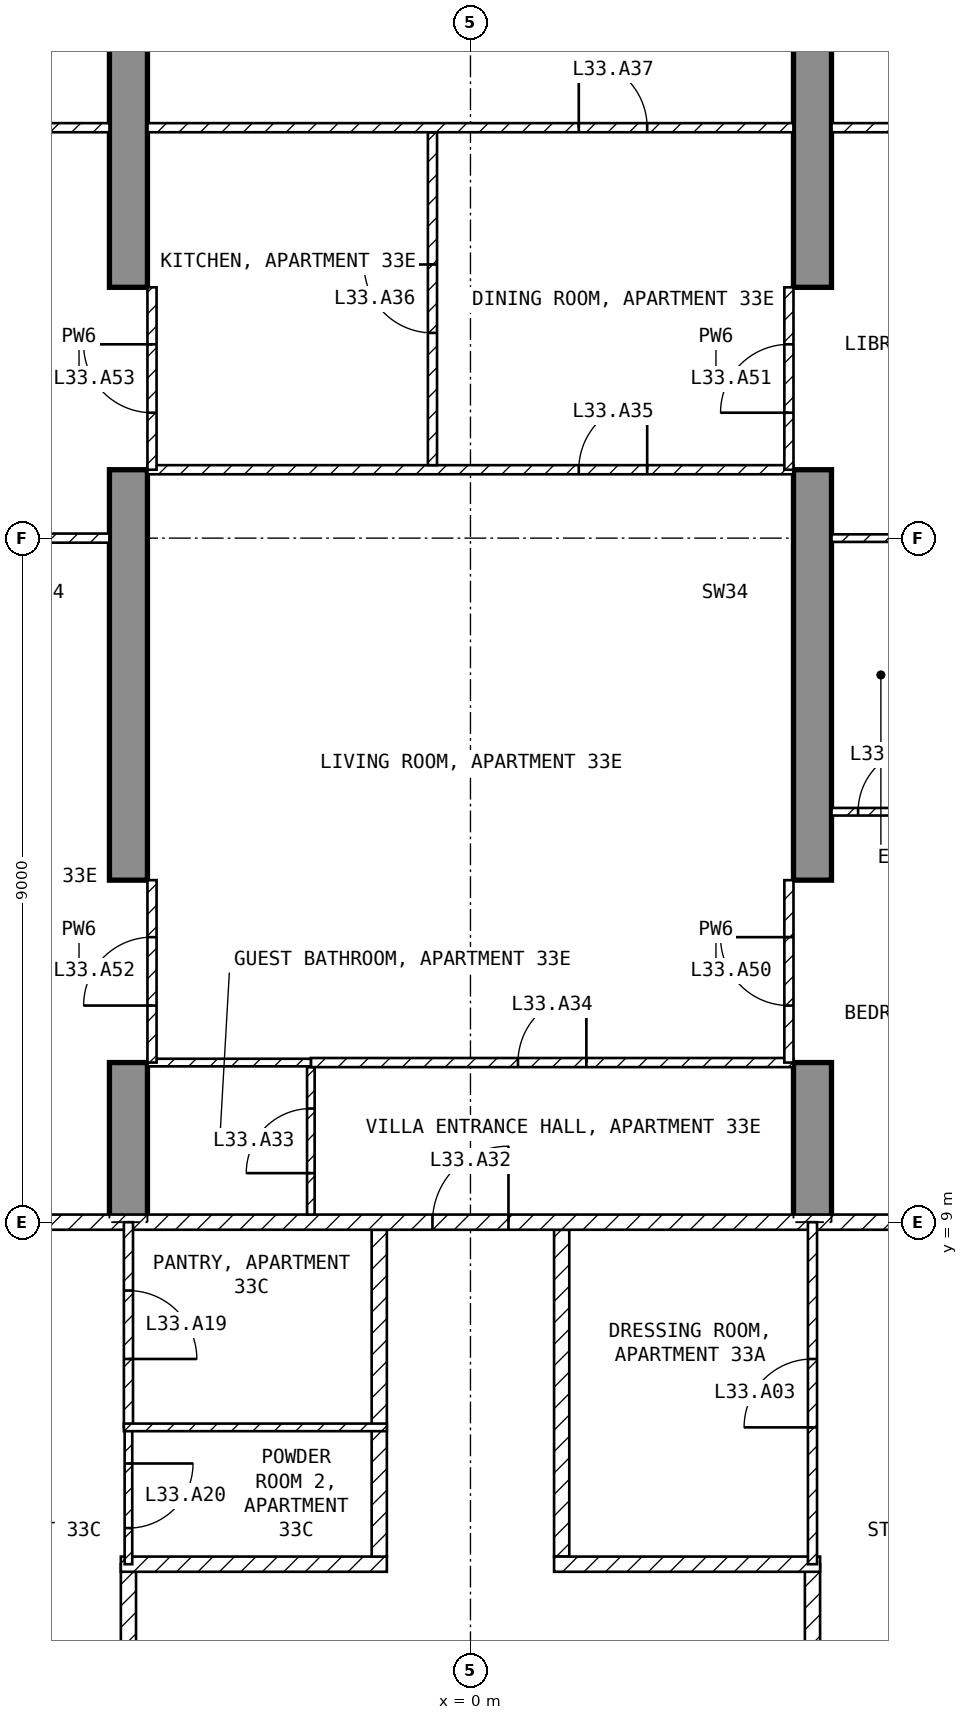
"""IFC4 building model, lengths in metres.
Left out: names, types, materials, properties, quantities, classifications, styles, units other than length and angle.
Written with IfcOpenShell. Run it as: python <this file> out.ifc"""

import sys

from ifc_helpers import new_model, si_unit, direction, frame, frame_2d, origin, place, context, subcontext, project, spatial, polyline, rectangle, outline, extrude, element, fill, save


model = new_model("IFC4")
c1 = context("Model", 3, precision=1e-05, world=origin(), true_north=direction((0.0, 1.0)))
c2 = subcontext(c1, "Body", "Model", "MODEL_VIEW")
j1 = project(units=[si_unit("LENGTHUNIT", "METRE"), si_unit("PLANEANGLEUNIT", "RADIAN")], contexts=[c1])
p1 = place(None, origin())
s1 = spatial("IfcSite", under=j1, at=p1, CompositionType="ELEMENT")
p2 = place(p1, origin())
s2 = spatial("IfcBuilding", under=s1, at=p2, CompositionType="ELEMENT")
p3 = place(p2, frame((0.0, 0.0, 137.4)))
s3 = spatial("IfcBuildingStorey", under=s2, at=p3, CompositionType="ELEMENT", Elevation=137.4)
for number, where, z_axis, x_axis in (
    (1, (-4.75, 9.0, -0.25), (1.0, 0.0, 0.0), (0.0, 1.0, 0.0)),
    (2, (4.25, 9.0, -0.25), (1.0, 0.0, 0.0), (0.0, 1.0, 0.0)),
):
    element("IfcWall", number, at=place(p3, frame(where, z_axis=z_axis, x_axis=x_axis)), inside=s3, PredefinedType="SHEAR", context=c2, shape_type="SweptSolid", body=[
        extrude(outline(polyline([(0.0, 0.0), (2.1, 0.0), (2.1, 2.65), (4.5, 2.65), (4.5, 0.0), (9.9, 0.0), (9.9, 2.65), (12.3, 2.65), (12.3, 0.0), (16.55, 0.0), (16.55, 3.5), (0.0, 3.5), (0.0, 0.0)])), origin(), (0.0, 0.0, 1.0), 0.5),
    ])
p4 = place(p3, frame((4.5, 4.5, 0.0), z_axis=(0.0, 0.0, 1.0), x_axis=(0.0, -1.0, 0.0)))
e3 = element("IfcWall", 3, at=p4, inside=s3, PredefinedType="PARTITIONING", context=c2, shape_type="SweptSolid", body=[
    extrude(rectangle(XDim=3.2, YDim=0.2, at=frame_2d((1.6, 0.0))), origin(), (0.0, 0.0, 1.0), 3.25),
])
p5 = place(p3, frame((1.2, 8.9, 0.0), z_axis=(0.0, 0.0, 1.0), x_axis=(0.0, -1.0, 0.0)))
e4 = element("IfcWall", 4, at=p5, inside=s3, PredefinedType="PARTITIONING", context=c2, shape_type="SweptSolid", body=[
    extrude(rectangle(XDim=4.3, YDim=0.2, at=frame_2d((2.15, 0.0))), origin(), (0.0, 0.0, 1.0), 3.25),
])
p6 = place(p3, frame((1.1, 4.5, 0.0), z_axis=(0.0, 0.0, 1.0), x_axis=(1.0, 0.0, 0.0)))
e5 = element("IfcWall", 5, at=p6, inside=s3, PredefinedType="PARTITIONING", context=c2, shape_type="SweptSolid", body=[
    extrude(rectangle(XDim=3.5, YDim=0.2, at=frame_2d((1.75, 0.0))), origin(), (0.0, 0.0, 1.0), 3.25),
])
p7 = place(p3, frame((-4.5, 1.3, 0.0), z_axis=(0.0, 0.0, 1.0), x_axis=(0.0, 1.0, 0.0)))
e6 = element("IfcWall", 6, at=p7, inside=s3, PredefinedType="PARTITIONING", context=c2, shape_type="SweptSolid", body=[
    extrude(rectangle(XDim=3.2, YDim=0.2, at=frame_2d((1.6, 0.0))), origin(), (0.0, 0.0, 1.0), 3.25),
])
p8 = place(p3, frame((-4.6, 4.5, 0.0), z_axis=(0.0, 0.0, 1.0), x_axis=(1.0, 0.0, 0.0)))
e7 = element("IfcWall", 7, at=p8, inside=s3, PredefinedType="PARTITIONING", context=c2, shape_type="SweptSolid", body=[
    extrude(rectangle(XDim=3.5, YDim=0.2, at=frame_2d((1.75, 0.0))), origin(), (0.0, 0.0, 1.0), 3.25),
])
p9 = place(p3, frame((-1.2, 4.6, 0.0), z_axis=(0.0, 0.0, 1.0), x_axis=(0.0, 1.0, 0.0)))
e8 = element("IfcWall", 8, at=p9, inside=s3, PredefinedType="PARTITIONING", context=c2, shape_type="SweptSolid", body=[
    extrude(rectangle(XDim=4.3, YDim=0.2, at=frame_2d((2.15, 0.0))), origin(), (0.0, 0.0, 1.0), 3.25),
])
p10 = place(p3, frame((-8.92, 9.0, 0.0), z_axis=(0.0, 0.0, 1.0), x_axis=(1.0, 0.0, 0.0)))
e9 = element("IfcWall", 9, at=p10, inside=s3, PredefinedType="PARTITIONING", context=c2, shape_type="SweptSolid", body=[
    extrude(rectangle(XDim=17.84, YDim=0.2, at=frame_2d((8.92, 0.0))), origin(), (0.0, 0.0, 1.0), 3.25),
])
p11 = place(p10, frame((8.42, 0.0, 0.0)))
e10 = element("IfcOpeningElement", 10, at=p11, cuts=e9, PredefinedType="OPENING", context=c2, shape_type="SweptSolid", body=[
    extrude(rectangle(XDim=1.0, YDim=2.1, at=frame_2d((0.5, 1.05))), frame((0.0, 0.11, 0.0), z_axis=(0.0, -1.0, 0.0), x_axis=(1.0, 0.0, 0.0)), (0.0, 0.0, 1.0), 0.22),
])
p12 = place(p3, frame((4.5, 4.5, 0.0), z_axis=(0.0, 0.0, 1.0), x_axis=(0.0, 1.0, 0.0)))
e11 = element("IfcWall", 11, at=p12, inside=s3, PredefinedType="PARTITIONING", context=c2, shape_type="SweptSolid", body=[
    extrude(rectangle(XDim=4.5, YDim=0.12, at=frame_2d((2.25, 0.0))), origin(), (0.0, 0.0, 1.0), 3.25),
])
p13 = place(p12, frame((1.8, 0.0, 0.0)))
e12 = element("IfcOpeningElement", 12, at=p13, cuts=e11, PredefinedType="OPENING", context=c2, shape_type="SweptSolid", body=[
    extrude(rectangle(XDim=0.9, YDim=2.1, at=frame_2d((0.45, 1.05))), frame((0.0, 0.07, 0.0), z_axis=(0.0, -1.0, 0.0), x_axis=(1.0, 0.0, 0.0)), (0.0, 0.0, 1.0), 0.14),
])
p14 = place(p3, frame((-4.5, 6.3, 0.0), z_axis=(0.0, 0.0, 1.0), x_axis=(0.0, -1.0, 0.0)))
e13 = element("IfcWall", 13, at=p14, inside=s3, PredefinedType="PARTITIONING", context=c2, shape_type="SweptSolid", body=[
    extrude(rectangle(XDim=1.8, YDim=0.1, at=frame_2d((0.9, 0.0))), origin(), (0.0, 0.0, 1.0), 3.25),
])
p15 = place(p14, frame((0.475, 0.0, 0.0)))
e14 = element("IfcOpeningElement", 14, at=p15, cuts=e13, PredefinedType="OPENING", context=c2, shape_type="SweptSolid", body=[
    extrude(rectangle(XDim=0.85, YDim=2.1, at=frame_2d((0.425, 1.05))), frame((0.0, 0.06, 0.0), z_axis=(0.0, -1.0, 0.0), x_axis=(1.0, 0.0, 0.0)), (0.0, 0.0, 1.0), 0.12),
])
p16 = place(p3, frame((-4.5, 9.0, 0.0), z_axis=(0.0, 0.0, 1.0), x_axis=(0.0, -1.0, 0.0)))
e15 = element("IfcWall", 15, at=p16, inside=s3, PredefinedType="PARTITIONING", context=c2, shape_type="SweptSolid", body=[
    extrude(rectangle(XDim=2.7, YDim=0.12, at=frame_2d((1.35, 0.0))), origin(), (0.0, 0.0, 1.0), 3.25),
])
p17 = place(p16, frame((0.9, 0.0, 0.0)))
e16 = element("IfcOpeningElement", 16, at=p17, cuts=e15, PredefinedType="OPENING", context=c2, shape_type="SweptSolid", body=[
    extrude(rectangle(XDim=0.9, YDim=2.1, at=frame_2d((0.45, 1.05))), frame((0.0, 0.07, 0.0), z_axis=(0.0, -1.0, 0.0), x_axis=(1.0, 0.0, 0.0)), (0.0, 0.0, 1.0), 0.14),
])
p18 = place(p3, frame((-4.56, 6.3, 0.0), z_axis=(0.0, 0.0, 1.0), x_axis=(1.0, 0.0, 0.0)))
e17 = element("IfcWall", 17, at=p18, inside=s3, PredefinedType="PARTITIONING", context=c2, shape_type="SweptSolid", body=[
    extrude(rectangle(XDim=3.46, YDim=0.1, at=frame_2d((1.73, 0.0))), origin(), (0.0, 0.0, 1.0), 3.25),
])
p19 = place(p3, frame((-2.1, 9.1, 0.0), z_axis=(0.0, 0.0, 1.0), x_axis=(0.0, 1.0, 0.0)))
e18 = element("IfcWall", 18, at=p19, inside=s3, PredefinedType="PARTITIONING", context=c2, shape_type="SweptSolid", body=[
    extrude(rectangle(XDim=1.94, YDim=0.1, at=frame_2d((0.97, 0.0))), origin(), (0.0, 0.0, 1.0), 3.25),
])
p20 = place(p19, frame((0.545, 0.0, 0.0)))
e19 = element("IfcOpeningElement", 19, at=p20, cuts=e18, PredefinedType="OPENING", context=c2, shape_type="SweptSolid", body=[
    extrude(rectangle(XDim=0.85, YDim=2.1, at=frame_2d((0.425, 1.05))), frame((0.0, 0.06, 0.0), z_axis=(0.0, -1.0, 0.0), x_axis=(1.0, 0.0, 0.0)), (0.0, 0.0, 1.0), 0.12),
])
p21 = place(p3, frame((-2.1, 11.1, 0.0), z_axis=(0.0, 0.0, 1.0), x_axis=(1.0, 0.0, 0.0)))
e20 = element("IfcWall", 20, at=p21, inside=s3, PredefinedType="PARTITIONING", context=c2, shape_type="SweptSolid", body=[
    extrude(rectangle(XDim=6.35, YDim=0.12, at=frame_2d((3.175, 0.0))), origin(), (0.0, 0.0, 1.0), 3.25),
])
p22 = place(p21, frame((2.725, 0.0, 0.0)))
e21 = element("IfcOpeningElement", 21, at=p22, cuts=e20, PredefinedType="OPENING", context=c2, shape_type="SweptSolid", body=[
    extrude(rectangle(XDim=0.9, YDim=2.1, at=frame_2d((0.45, 1.05))), frame((0.0, 0.07, 0.0), z_axis=(0.0, -1.0, 0.0), x_axis=(1.0, 0.0, 0.0)), (0.0, 0.0, 1.0), 0.14),
])
p23 = place(p3, frame((-4.25, 11.1, 0.0), z_axis=(0.0, 0.0, 1.0), x_axis=(1.0, 0.0, 0.0)))
e22 = element("IfcWall", 22, at=p23, inside=s3, PredefinedType="PARTITIONING", context=c2, shape_type="SweptSolid", body=[
    extrude(rectangle(XDim=2.15, YDim=0.1, at=frame_2d((1.075, 0.0))), origin(), (0.0, 0.0, 1.0), 3.25),
])
p24 = place(p3, frame((-4.25, 18.9, 0.0), z_axis=(0.0, 0.0, 1.0), x_axis=(1.0, 0.0, 0.0)))
e23 = element("IfcWall", 23, at=p24, inside=s3, PredefinedType="PARTITIONING", context=c2, shape_type="SweptSolid", body=[
    extrude(rectangle(XDim=8.5, YDim=0.12, at=frame_2d((4.25, 0.0))), origin(), (0.0, 0.0, 1.0), 3.25),
])
p25 = place(p24, frame((5.675, 0.0, 0.0)))
e24 = element("IfcOpeningElement", 24, at=p25, cuts=e23, PredefinedType="OPENING", context=c2, shape_type="SweptSolid", body=[
    extrude(rectangle(XDim=0.9, YDim=2.1, at=frame_2d((0.45, 1.05))), frame((0.0, 0.07, 0.0), z_axis=(0.0, -1.0, 0.0), x_axis=(1.0, 0.0, 0.0)), (0.0, 0.0, 1.0), 0.14),
])
p26 = place(p3, frame((-0.5, 18.96, 0.0), z_axis=(0.0, 0.0, 1.0), x_axis=(0.0, 1.0, 0.0)))
e25 = element("IfcWall", 25, at=p26, inside=s3, PredefinedType="PARTITIONING", context=c2, shape_type="SweptSolid", body=[
    extrude(rectangle(XDim=4.38, YDim=0.12, at=frame_2d((2.19, 0.0))), origin(), (0.0, 0.0, 1.0), 3.25),
])
p27 = place(p26, frame((1.74, 0.0, 0.0)))
e26 = element("IfcOpeningElement", 26, at=p27, cuts=e25, PredefinedType="OPENING", context=c2, shape_type="SweptSolid", body=[
    extrude(rectangle(XDim=0.9, YDim=2.1, at=frame_2d((0.45, 1.05))), frame((0.0, 0.07, 0.0), z_axis=(0.0, -1.0, 0.0), x_axis=(1.0, 0.0, 0.0)), (0.0, 0.0, 1.0), 0.14),
])
p28 = place(p3, frame((-4.25, 23.4, 0.0), z_axis=(0.0, 0.0, 1.0), x_axis=(1.0, 0.0, 0.0)))
e27 = element("IfcWall", 27, at=p28, inside=s3, PredefinedType="PARTITIONING", context=c2, shape_type="SweptSolid", body=[
    extrude(rectangle(XDim=8.5, YDim=0.12, at=frame_2d((4.25, 0.0))), origin(), (0.0, 0.0, 1.0), 3.25),
])
p29 = place(p28, frame((5.675, 0.0, 0.0)))
e28 = element("IfcOpeningElement", 28, at=p29, cuts=e27, PredefinedType="OPENING", context=c2, shape_type="SweptSolid", body=[
    extrude(rectangle(XDim=0.9, YDim=2.1, at=frame_2d((0.45, 1.05))), frame((0.0, 0.07, 0.0), z_axis=(0.0, -1.0, 0.0), x_axis=(1.0, 0.0, 0.0)), (0.0, 0.0, 1.0), 0.14),
])
p30 = place(p3, frame((4.75, 14.4, 0.0), z_axis=(0.0, 0.0, 1.0), x_axis=(1.0, 0.0, 0.0)))
e29 = element("IfcWall", 29, at=p30, inside=s3, PredefinedType="PARTITIONING", context=c2, shape_type="SweptSolid", body=[
    extrude(rectangle(XDim=1.6, YDim=0.1, at=frame_2d((0.8, 0.0))), origin(), (0.0, 0.0, 1.0), 3.25),
])
p31 = place(p30, frame((0.35, 0.0, 0.0)))
e30 = element("IfcOpeningElement", 30, at=p31, cuts=e29, PredefinedType="OPENING", context=c2, shape_type="SweptSolid", body=[
    extrude(rectangle(XDim=0.85, YDim=2.1, at=frame_2d((0.425, 1.05))), frame((0.0, 0.06, 0.0), z_axis=(0.0, -1.0, 0.0), x_axis=(1.0, 0.0, 0.0)), (0.0, 0.0, 1.0), 0.12),
])
p32 = place(p3, frame((4.75, 18.0, 0.0), z_axis=(0.0, 0.0, 1.0), x_axis=(1.0, 0.0, 0.0)))
e31 = element("IfcWall", 31, at=p32, inside=s3, PredefinedType="PARTITIONING", context=c2, shape_type="SweptSolid", body=[
    extrude(rectangle(XDim=1.55, YDim=0.1, at=frame_2d((0.775, 0.0))), origin(), (0.0, 0.0, 1.0), 2.414),
])
p33 = place(p3, frame((4.75, 23.4, 0.0), z_axis=(0.0, 0.0, 1.0), x_axis=(1.0, 0.0, 0.0)))
e32 = element("IfcWall", 32, at=p33, inside=s3, PredefinedType="PARTITIONING", context=c2, shape_type="SweptSolid", body=[
    extrude(rectangle(XDim=2.37, YDim=0.12, at=frame_2d((1.185, 0.0))), origin(), (0.0, 0.0, 1.0), 3.25),
])
p34 = place(p3, frame((-8.92, 18.0, 0.0), z_axis=(0.0, 0.0, 1.0), x_axis=(1.0, 0.0, 0.0)))
e33 = element("IfcWall", 33, at=p34, inside=s3, PredefinedType="PARTITIONING", context=c2, shape_type="SweptSolid", body=[
    extrude(rectangle(XDim=4.17, YDim=0.12, at=frame_2d((2.085, 0.0))), origin(), (0.0, 0.0, 1.0), 2.414),
])
p35 = place(p3, frame((-7.12, 23.4, 0.0), z_axis=(0.0, 0.0, 1.0), x_axis=(1.0, 0.0, 0.0)))
e34 = element("IfcWall", 34, at=p35, inside=s3, PredefinedType="PARTITIONING", context=c2, shape_type="SweptSolid", body=[
    extrude(rectangle(XDim=2.37, YDim=0.12, at=frame_2d((1.185, 0.0))), origin(), (0.0, 0.0, 1.0), 3.25),
])
p36 = place(p3, frame((4.19, 11.1, 0.0), z_axis=(0.0, 0.0, 1.0), x_axis=(0.0, 1.0, 0.0)))
e35 = element("IfcWall", 35, at=p36, inside=s3, PredefinedType="PARTITIONING", context=c2, shape_type="SweptSolid", body=[
    extrude(rectangle(XDim=2.4, YDim=0.12, at=frame_2d((1.2, 0.0))), origin(), (0.0, 0.0, 1.0), 2.4),
])
p37 = place(p36, frame((0.75, 0.0, 0.0)))
e36 = element("IfcOpeningElement", 36, at=p37, cuts=e35, PredefinedType="OPENING", context=c2, shape_type="SweptSolid", body=[
    extrude(rectangle(XDim=0.9, YDim=2.1, at=frame_2d((0.45, 1.05))), frame((0.0, 0.07, 0.0), z_axis=(0.0, -1.0, 0.0), x_axis=(1.0, 0.0, 0.0)), (0.0, 0.0, 1.0), 0.14),
])
p38 = place(p3, frame((4.19, 18.9, 0.0), z_axis=(0.0, 0.0, 1.0), x_axis=(0.0, 1.0, 0.0)))
e37 = element("IfcWall", 37, at=p38, inside=s3, PredefinedType="PARTITIONING", context=c2, shape_type="SweptSolid", body=[
    extrude(rectangle(XDim=2.4, YDim=0.12, at=frame_2d((1.2, 0.0))), origin(), (0.0, 0.0, 1.0), 2.4),
])
p39 = place(p38, frame((0.75, 0.0, 0.0)))
e38 = element("IfcOpeningElement", 38, at=p39, cuts=e37, PredefinedType="OPENING", context=c2, shape_type="SweptSolid", body=[
    extrude(rectangle(XDim=0.9, YDim=2.1, at=frame_2d((0.45, 1.05))), frame((0.0, 0.07, 0.0), z_axis=(0.0, -1.0, 0.0), x_axis=(1.0, 0.0, 0.0)), (0.0, 0.0, 1.0), 0.14),
])
p40 = place(p3, frame((-4.19, 11.1, 0.0), z_axis=(0.0, 0.0, 1.0), x_axis=(0.0, 1.0, 0.0)))
e39 = element("IfcWall", 39, at=p40, inside=s3, PredefinedType="PARTITIONING", context=c2, shape_type="SweptSolid", body=[
    extrude(rectangle(XDim=2.4, YDim=0.12, at=frame_2d((1.2, 0.0))), origin(), (0.0, 0.0, 1.0), 2.4),
])
p41 = place(p40, frame((0.75, 0.0, 0.0)))
e40 = element("IfcOpeningElement", 40, at=p41, cuts=e39, PredefinedType="OPENING", context=c2, shape_type="SweptSolid", body=[
    extrude(rectangle(XDim=0.9, YDim=2.1, at=frame_2d((0.45, 1.05))), frame((0.0, 0.07, 0.0), z_axis=(0.0, -1.0, 0.0), x_axis=(1.0, 0.0, 0.0)), (0.0, 0.0, 1.0), 0.14),
])
p42 = place(p3, frame((-4.19, 18.9, 0.0), z_axis=(0.0, 0.0, 1.0), x_axis=(0.0, 1.0, 0.0)))
e41 = element("IfcWall", 41, at=p42, inside=s3, PredefinedType="PARTITIONING", context=c2, shape_type="SweptSolid", body=[
    extrude(rectangle(XDim=2.4, YDim=0.12, at=frame_2d((1.2, 0.0))), origin(), (0.0, 0.0, 1.0), 2.4),
])
p43 = place(p42, frame((0.75, 0.0, 0.0)))
e42 = element("IfcOpeningElement", 42, at=p43, cuts=e41, PredefinedType="OPENING", context=c2, shape_type="SweptSolid", body=[
    extrude(rectangle(XDim=0.9, YDim=2.1, at=frame_2d((0.45, 1.05))), frame((0.0, 0.07, 0.0), z_axis=(0.0, -1.0, 0.0), x_axis=(1.0, 0.0, 0.0)), (0.0, 0.0, 1.0), 0.14),
])
p44 = place(p13, origin())
e43 = element("IfcDoor", 43, at=p44, inside=s3, OperationType="SINGLE_SWING_LEFT", PredefinedType="DOOR", context=c2, shape_type="SweptSolid", body=[
    extrude(rectangle(XDim=0.9, YDim=2.1, at=frame_2d((0.45, 1.05))), frame((0.0, 0.025, 0.0), z_axis=(0.0, -1.0, 0.0), x_axis=(1.0, 0.0, 0.0)), (0.0, 0.0, 1.0), 0.05),
])
fill(e12, e43)
p45 = place(p17, origin())
e44 = element("IfcDoor", 44, at=p45, inside=s3, OperationType="SINGLE_SWING_RIGHT", PredefinedType="DOOR", context=c2, shape_type="SweptSolid", body=[
    extrude(rectangle(XDim=0.9, YDim=2.1, at=frame_2d((0.45, 1.05))), frame((0.0, 0.025, 0.0), z_axis=(0.0, -1.0, 0.0), x_axis=(1.0, 0.0, 0.0)), (0.0, 0.0, 1.0), 0.05),
])
fill(e16, e44)
p46 = place(p15, origin())
e45 = element("IfcDoor", 45, at=p46, inside=s3, OperationType="SINGLE_SWING_LEFT", PredefinedType="DOOR", context=c2, shape_type="SweptSolid", body=[
    extrude(rectangle(XDim=0.85, YDim=2.1, at=frame_2d((0.425, 1.05))), frame((0.0, 0.025, 0.0), z_axis=(0.0, -1.0, 0.0), x_axis=(1.0, 0.0, 0.0)), (0.0, 0.0, 1.0), 0.05),
])
fill(e14, e45)
p47 = place(p11, origin())
e46 = element("IfcDoor", 46, at=p47, inside=s3, OperationType="SINGLE_SWING_RIGHT", PredefinedType="DOOR", context=c2, shape_type="SweptSolid", body=[
    extrude(rectangle(XDim=1.0, YDim=2.1, at=frame_2d((0.5, 1.05))), frame((0.0, 0.025, 0.0), z_axis=(0.0, -1.0, 0.0), x_axis=(1.0, 0.0, 0.0)), (0.0, 0.0, 1.0), 0.05),
])
fill(e10, e46)
p48 = place(p20, origin())
e47 = element("IfcDoor", 47, at=p48, inside=s3, OperationType="SINGLE_SWING_LEFT", PredefinedType="DOOR", context=c2, shape_type="SweptSolid", body=[
    extrude(rectangle(XDim=0.85, YDim=2.1, at=frame_2d((0.425, 1.05))), frame((0.0, 0.025, 0.0), z_axis=(0.0, -1.0, 0.0), x_axis=(1.0, 0.0, 0.0)), (0.0, 0.0, 1.0), 0.05),
])
fill(e19, e47)
p49 = place(p22, origin())
e48 = element("IfcDoor", 48, at=p49, inside=s3, OperationType="SINGLE_SWING_RIGHT", PredefinedType="DOOR", context=c2, shape_type="SweptSolid", body=[
    extrude(rectangle(XDim=0.9, YDim=2.1, at=frame_2d((0.45, 1.05))), frame((0.0, 0.025, 0.0), z_axis=(0.0, -1.0, 0.0), x_axis=(1.0, 0.0, 0.0)), (0.0, 0.0, 1.0), 0.05),
])
fill(e21, e48)
p50 = place(p25, origin())
e49 = element("IfcDoor", 49, at=p50, inside=s3, OperationType="SINGLE_SWING_RIGHT", PredefinedType="DOOR", context=c2, shape_type="SweptSolid", body=[
    extrude(rectangle(XDim=0.9, YDim=2.1, at=frame_2d((0.45, 1.05))), frame((0.0, 0.025, 0.0), z_axis=(0.0, -1.0, 0.0), x_axis=(1.0, 0.0, 0.0)), (0.0, 0.0, 1.0), 0.05),
])
fill(e24, e49)
p51 = place(p27, origin())
e50 = element("IfcDoor", 50, at=p51, inside=s3, OperationType="SINGLE_SWING_RIGHT", PredefinedType="DOOR", context=c2, shape_type="SweptSolid", body=[
    extrude(rectangle(XDim=0.9, YDim=2.1, at=frame_2d((0.45, 1.05))), frame((0.0, 0.025, 0.0), z_axis=(0.0, -1.0, 0.0), x_axis=(1.0, 0.0, 0.0)), (0.0, 0.0, 1.0), 0.05),
])
fill(e26, e50)
p52 = place(p29, origin())
e51 = element("IfcDoor", 51, at=p52, inside=s3, OperationType="SINGLE_SWING_LEFT", PredefinedType="DOOR", context=c2, shape_type="SweptSolid", body=[
    extrude(rectangle(XDim=0.9, YDim=2.1, at=frame_2d((0.45, 1.05))), frame((0.0, 0.025, 0.0), z_axis=(0.0, -1.0, 0.0), x_axis=(1.0, 0.0, 0.0)), (0.0, 0.0, 1.0), 0.05),
])
fill(e28, e51)
p53 = place(p31, origin())
e52 = element("IfcDoor", 52, at=p53, inside=s3, OperationType="SINGLE_SWING_RIGHT", PredefinedType="DOOR", context=c2, shape_type="SweptSolid", body=[
    extrude(rectangle(XDim=0.85, YDim=2.1, at=frame_2d((0.425, 1.05))), frame((0.0, 0.025, 0.0), z_axis=(0.0, -1.0, 0.0), x_axis=(1.0, 0.0, 0.0)), (0.0, 0.0, 1.0), 0.05),
])
fill(e30, e52)
p54 = place(p37, origin())
e53 = element("IfcDoor", 53, at=p54, inside=s3, OperationType="SINGLE_SWING_RIGHT", PredefinedType="DOOR", context=c2, shape_type="SweptSolid", body=[
    extrude(rectangle(XDim=0.9, YDim=2.1, at=frame_2d((0.45, 1.05))), frame((0.0, 0.025, 0.0), z_axis=(0.0, -1.0, 0.0), x_axis=(1.0, 0.0, 0.0)), (0.0, 0.0, 1.0), 0.05),
])
fill(e36, e53)
p55 = place(p39, origin())
e54 = element("IfcDoor", 54, at=p55, inside=s3, OperationType="SINGLE_SWING_LEFT", PredefinedType="DOOR", context=c2, shape_type="SweptSolid", body=[
    extrude(rectangle(XDim=0.9, YDim=2.1, at=frame_2d((0.45, 1.05))), frame((0.0, 0.025, 0.0), z_axis=(0.0, -1.0, 0.0), x_axis=(1.0, 0.0, 0.0)), (0.0, 0.0, 1.0), 0.05),
])
fill(e38, e54)
p56 = place(p41, origin())
e55 = element("IfcDoor", 55, at=p56, inside=s3, OperationType="SINGLE_SWING_LEFT", PredefinedType="DOOR", context=c2, shape_type="SweptSolid", body=[
    extrude(rectangle(XDim=0.9, YDim=2.1, at=frame_2d((0.45, 1.05))), frame((0.0, 0.025, 0.0), z_axis=(0.0, -1.0, 0.0), x_axis=(1.0, 0.0, 0.0)), (0.0, 0.0, 1.0), 0.05),
])
fill(e40, e55)
p57 = place(p43, origin())
e56 = element("IfcDoor", 56, at=p57, inside=s3, OperationType="SINGLE_SWING_RIGHT", PredefinedType="DOOR", context=c2, shape_type="SweptSolid", body=[
    extrude(rectangle(XDim=0.9, YDim=2.1, at=frame_2d((0.45, 1.05))), frame((0.0, 0.025, 0.0), z_axis=(0.0, -1.0, 0.0), x_axis=(1.0, 0.0, 0.0)), (0.0, 0.0, 1.0), 0.05),
])
fill(e42, e56)
save(model, sys.argv[1])
